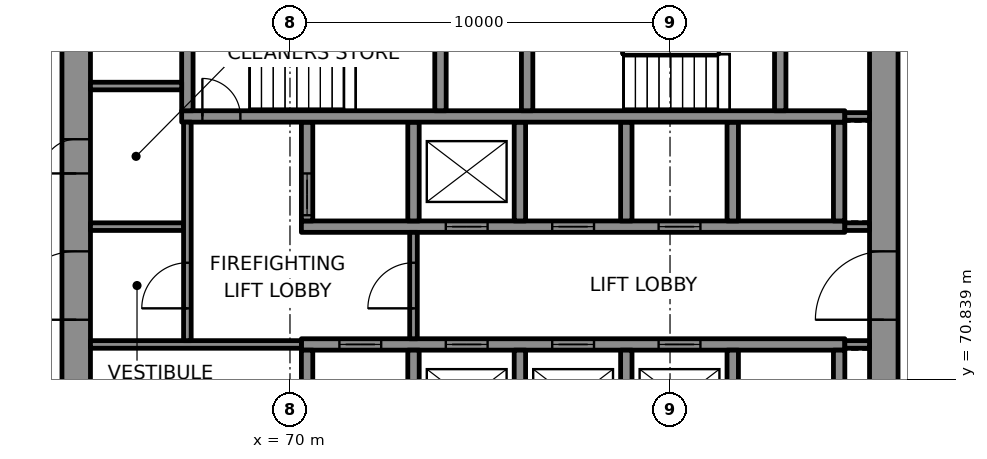
"""IFC4 building model, lengths in metres.
Left out: names, types, materials, properties, quantities, classifications, styles, units other than length and angle.
Written with IfcOpenShell. Run it as: python <this file> out.ifc"""

import sys

from ifc_helpers import new_model, si_unit, direction, frame, frame_2d, origin, place, context, subcontext, project, spatial, rectangle, extrude, element, fill, save


model = new_model("IFC4")
c1 = context("Model", 3, precision=1e-05, world=origin(), true_north=direction((0.0, 1.0)))
c2 = subcontext(c1, "Body", "Model", "MODEL_VIEW")
j1 = project(units=[si_unit("LENGTHUNIT", "METRE"), si_unit("PLANEANGLEUNIT", "RADIAN")], contexts=[c1])
p1 = place(None, origin())
s1 = spatial("IfcSite", under=j1, at=p1, CompositionType="ELEMENT")
p2 = place(p1, origin())
s2 = spatial("IfcBuilding", under=s1, at=p2, CompositionType="ELEMENT")
p3 = place(p2, frame((0.0, 0.0, 241.6)))
s3 = spatial("IfcBuildingStorey", under=s2, at=p3, CompositionType="ELEMENT", Elevation=241.6)
p4 = place(p3, frame((64.375, 67.75, 0.0), z_axis=(0.0, 0.0, 1.0), x_axis=(0.0, 1.0, 0.0)))
e1 = element("IfcWall", 1, at=p4, inside=s3, PredefinedType="SHEAR", context=c2, shape_type="SweptSolid", body=[
    extrude(rectangle(XDim=14.5, YDim=0.75, at=frame_2d((7.25, 0.0))), origin(), (0.0, 0.0, 1.0), 5.55),
])
p5 = place(p4, frame((4.65, 0.0, 0.0)))
e2 = element("IfcOpeningElement", 2, at=p5, cuts=e1, PredefinedType="OPENING", context=c2, shape_type="SweptSolid", body=[
    extrude(rectangle(XDim=1.8, YDim=2.1, at=frame_2d((0.9, 1.05))), frame((0.0, 0.385, 0.0), z_axis=(0.0, -1.0, 0.0), x_axis=(1.0, 0.0, 0.0)), (0.0, 0.0, 1.0), 0.77),
])
p6 = place(p4, frame((8.5, 0.0, 0.0)))
e3 = element("IfcOpeningElement", 3, at=p6, cuts=e1, PredefinedType="OPENING", context=c2, shape_type="SweptSolid", body=[
    extrude(rectangle(XDim=0.9, YDim=2.1, at=frame_2d((0.45, 1.05))), frame((0.0, 0.385, 0.0), z_axis=(0.0, -1.0, 0.0), x_axis=(1.0, 0.0, 0.0)), (0.0, 0.0, 1.0), 0.77),
])
p7 = place(p4, frame((12.2, 0.0, 0.0)))
e4 = element("IfcOpeningElement", 4, at=p7, cuts=e1, PredefinedType="OPENING", context=c2, shape_type="SweptSolid", body=[
    extrude(rectangle(XDim=0.9, YDim=2.1, at=frame_2d((0.45, 1.05))), frame((0.0, 0.385, 0.0), z_axis=(0.0, -1.0, 0.0), x_axis=(1.0, 0.0, 0.0)), (0.0, 0.0, 1.0), 0.77),
])
p8 = place(p3, frame((85.625, 67.75, 0.0), z_axis=(0.0, 0.0, 1.0), x_axis=(0.0, 1.0, 0.0)))
e5 = element("IfcWall", 5, at=p8, inside=s3, PredefinedType="SHEAR", context=c2, shape_type="SweptSolid", body=[
    extrude(rectangle(XDim=14.5, YDim=0.75, at=frame_2d((7.25, 0.0))), origin(), (0.0, 0.0, 1.0), 5.55),
])
p9 = place(p8, frame((4.65, 0.0, 0.0)))
e6 = element("IfcOpeningElement", 6, at=p9, cuts=e5, PredefinedType="OPENING", context=c2, shape_type="SweptSolid", body=[
    extrude(rectangle(XDim=1.8, YDim=2.1, at=frame_2d((0.9, 1.05))), frame((0.0, 0.385, 0.0), z_axis=(0.0, -1.0, 0.0), x_axis=(1.0, 0.0, 0.0)), (0.0, 0.0, 1.0), 0.77),
])
p10 = place(p8, frame((11.8, 0.0, 0.0)))
e7 = element("IfcOpeningElement", 7, at=p10, cuts=e5, PredefinedType="OPENING", context=c2, shape_type="SweptSolid", body=[
    extrude(rectangle(XDim=0.9, YDim=2.1, at=frame_2d((0.45, 1.05))), frame((0.0, 0.385, 0.0), z_axis=(0.0, -1.0, 0.0), x_axis=(1.0, 0.0, 0.0)), (0.0, 0.0, 1.0), 0.77),
])
p11 = place(p3, frame((70.3, 71.75, 0.0), z_axis=(0.0, 0.0, 1.0), x_axis=(1.0, 0.0, 0.0)))
e8 = element("IfcWall", 8, at=p11, inside=s3, PredefinedType="SHEAR", context=c2, shape_type="SweptSolid", body=[
    extrude(rectangle(XDim=14.3, YDim=0.3, at=frame_2d((7.15, 0.0))), origin(), (0.0, 0.0, 1.0), 5.55),
])
p12 = place(p11, frame((1.0, 0.0, 0.0)))
e9 = element("IfcOpeningElement", 9, at=p12, cuts=e8, PredefinedType="OPENING", context=c2, shape_type="SweptSolid", body=[
    extrude(rectangle(XDim=1.1, YDim=2.1, at=frame_2d((0.55, 1.05))), frame((0.0, 0.16, 0.0), z_axis=(0.0, -1.0, 0.0), x_axis=(1.0, 0.0, 0.0)), (0.0, 0.0, 1.0), 0.32),
])
p13 = place(p11, frame((3.8, 0.0, 0.0)))
e10 = element("IfcOpeningElement", 10, at=p13, cuts=e8, PredefinedType="OPENING", context=c2, shape_type="SweptSolid", body=[
    extrude(rectangle(XDim=1.1, YDim=2.1, at=frame_2d((0.55, 1.05))), frame((0.0, 0.16, 0.0), z_axis=(0.0, -1.0, 0.0), x_axis=(1.0, 0.0, 0.0)), (0.0, 0.0, 1.0), 0.32),
])
p14 = place(p11, frame((6.6, 0.0, 0.0)))
e11 = element("IfcOpeningElement", 11, at=p14, cuts=e8, PredefinedType="OPENING", context=c2, shape_type="SweptSolid", body=[
    extrude(rectangle(XDim=1.1, YDim=2.1, at=frame_2d((0.55, 1.05))), frame((0.0, 0.16, 0.0), z_axis=(0.0, -1.0, 0.0), x_axis=(1.0, 0.0, 0.0)), (0.0, 0.0, 1.0), 0.32),
])
p15 = place(p11, frame((9.4, 0.0, 0.0)))
e12 = element("IfcOpeningElement", 12, at=p15, cuts=e8, PredefinedType="OPENING", context=c2, shape_type="SweptSolid", body=[
    extrude(rectangle(XDim=1.1, YDim=2.1, at=frame_2d((0.55, 1.05))), frame((0.0, 0.16, 0.0), z_axis=(0.0, -1.0, 0.0), x_axis=(1.0, 0.0, 0.0)), (0.0, 0.0, 1.0), 0.32),
])
p16 = place(p3, frame((70.3, 74.85, 0.0), z_axis=(0.0, 0.0, 1.0), x_axis=(1.0, 0.0, 0.0)))
e13 = element("IfcWall", 13, at=p16, inside=s3, PredefinedType="SHEAR", context=c2, shape_type="SweptSolid", body=[
    extrude(rectangle(XDim=14.3, YDim=0.3, at=frame_2d((7.15, 0.0))), origin(), (0.0, 0.0, 1.0), 5.55),
])
p17 = place(p16, frame((3.8, 0.0, 0.0)))
e14 = element("IfcOpeningElement", 14, at=p17, cuts=e13, PredefinedType="OPENING", context=c2, shape_type="SweptSolid", body=[
    extrude(rectangle(XDim=1.1, YDim=2.1, at=frame_2d((0.55, 1.05))), frame((0.0, 0.16, 0.0), z_axis=(0.0, -1.0, 0.0), x_axis=(1.0, 0.0, 0.0)), (0.0, 0.0, 1.0), 0.32),
])
p18 = place(p16, frame((6.6, 0.0, 0.0)))
e15 = element("IfcOpeningElement", 15, at=p18, cuts=e13, PredefinedType="OPENING", context=c2, shape_type="SweptSolid", body=[
    extrude(rectangle(XDim=1.1, YDim=2.1, at=frame_2d((0.55, 1.05))), frame((0.0, 0.16, 0.0), z_axis=(0.0, -1.0, 0.0), x_axis=(1.0, 0.0, 0.0)), (0.0, 0.0, 1.0), 0.32),
])
p19 = place(p16, frame((9.4, 0.0, 0.0)))
e16 = element("IfcOpeningElement", 16, at=p19, cuts=e13, PredefinedType="OPENING", context=c2, shape_type="SweptSolid", body=[
    extrude(rectangle(XDim=1.1, YDim=2.1, at=frame_2d((0.55, 1.05))), frame((0.0, 0.16, 0.0), z_axis=(0.0, -1.0, 0.0), x_axis=(1.0, 0.0, 0.0)), (0.0, 0.0, 1.0), 0.32),
])
p20 = place(p3, frame((70.45, 69.0, 0.0), z_axis=(0.0, 0.0, 1.0), x_axis=(0.0, 1.0, 0.0)))
e17 = element("IfcWall", 17, at=p20, inside=s3, PredefinedType="SHEAR", context=c2, shape_type="SweptSolid", body=[
    extrude(rectangle(XDim=2.6, YDim=0.3, at=frame_2d((1.3, 0.0))), origin(), (0.0, 0.0, 1.0), 5.55),
])
p21 = place(p3, frame((70.45, 75.0, 0.0), z_axis=(0.0, 0.0, 1.0), x_axis=(0.0, 1.0, 0.0)))
e18 = element("IfcWall", 18, at=p21, inside=s3, PredefinedType="SHEAR", context=c2, shape_type="SweptSolid", body=[
    extrude(rectangle(XDim=2.6, YDim=0.3, at=frame_2d((1.3, 0.0))), origin(), (0.0, 0.0, 1.0), 5.55),
])
p22 = place(p21, frame((0.15, 0.0, 0.0)))
e19 = element("IfcOpeningElement", 19, at=p22, cuts=e18, PredefinedType="OPENING", context=c2, shape_type="SweptSolid", body=[
    extrude(rectangle(XDim=1.1, YDim=2.1, at=frame_2d((0.55, 1.05))), frame((0.0, 0.16, 0.0), z_axis=(0.0, -1.0, 0.0), x_axis=(1.0, 0.0, 0.0)), (0.0, 0.0, 1.0), 0.32),
])
for number, where, z_axis, x_axis in (
    (20, (73.25, 69.0, 0.0), (0.0, 0.0, 1.0), (0.0, 1.0, 0.0)),
    (21, (73.25, 75.0, 0.0), (0.0, 0.0, 1.0), (0.0, 1.0, 0.0)),
    (22, (76.05, 69.0, 0.0), (0.0, 0.0, 1.0), (0.0, 1.0, 0.0)),
    (23, (76.05, 75.0, 0.0), (0.0, 0.0, 1.0), (0.0, 1.0, 0.0)),
    (24, (78.85, 69.0, 0.0), (0.0, 0.0, 1.0), (0.0, 1.0, 0.0)),
    (25, (78.85, 75.0, 0.0), (0.0, 0.0, 1.0), (0.0, 1.0, 0.0)),
    (26, (81.65, 69.0, 0.0), (0.0, 0.0, 1.0), (0.0, 1.0, 0.0)),
    (27, (81.65, 75.0, 0.0), (0.0, 0.0, 1.0), (0.0, 1.0, 0.0)),
    (28, (84.45, 69.0, 0.0), (0.0, 0.0, 1.0), (0.0, 1.0, 0.0)),
    (29, (84.45, 75.0, 0.0), (0.0, 0.0, 1.0), (0.0, 1.0, 0.0)),
):
    element("IfcWall", number, at=place(p3, frame(where, z_axis=z_axis, x_axis=x_axis)), inside=s3, PredefinedType="SHEAR", context=c2, shape_type="SweptSolid", body=[
        extrude(rectangle(XDim=2.6, YDim=0.3, at=frame_2d((1.3, 0.0))), origin(), (0.0, 0.0, 1.0), 5.55),
    ])
p23 = place(p3, frame((67.15, 77.75, 0.0), z_axis=(0.0, 0.0, 1.0), x_axis=(1.0, 0.0, 0.0)))
e30 = element("IfcWall", 30, at=p23, inside=s3, PredefinedType="SHEAR", context=c2, shape_type="SweptSolid", body=[
    extrude(rectangle(XDim=17.45, YDim=0.3, at=frame_2d((8.725, 0.0))), origin(), (0.0, 0.0, 1.0), 5.55),
])
p24 = place(p23, frame((0.545, 0.0, 0.0)))
e31 = element("IfcOpeningElement", 31, at=p24, cuts=e30, PredefinedType="OPENING", context=c2, shape_type="SweptSolid", body=[
    extrude(rectangle(XDim=1.0, YDim=2.1, at=frame_2d((0.5, 1.05))), frame((0.0, 0.16, 0.0), z_axis=(0.0, -1.0, 0.0), x_axis=(1.0, 0.0, 0.0)), (0.0, 0.0, 1.0), 0.32),
])
for number, where, z_axis, x_axis in (
    (32, (67.3, 77.9, 0.0), (0.0, 0.0, 1.0), (0.0, 1.0, 0.0)),
    (33, (73.96, 77.9, 0.0), (0.0, 0.0, 1.0), (0.0, 1.0, 0.0)),
    (34, (76.24, 77.9, 0.0), (0.0, 0.0, 1.0), (0.0, 1.0, 0.0)),
    (35, (82.9, 77.9, 0.0), (0.0, 0.0, 1.0), (0.0, 1.0, 0.0)),
):
    element("IfcWall", number, at=place(p3, frame(where, z_axis=z_axis, x_axis=x_axis)), inside=s3, PredefinedType="SHEAR", context=c2, shape_type="SweptSolid", body=[
        extrude(rectangle(XDim=3.08, YDim=0.3, at=frame_2d((1.54, 0.0))), origin(), (0.0, 0.0, 1.0), 5.55),
    ])
p25 = place(p3, frame((64.75, 71.75, 0.0), z_axis=(0.0, 0.0, 1.0), x_axis=(1.0, 0.0, 0.0)))
e36 = element("IfcWall", 36, at=p25, inside=s3, PredefinedType="PARTITIONING", context=c2, shape_type="SweptSolid", body=[
    extrude(rectangle(XDim=5.55, YDim=0.2, at=frame_2d((2.775, 0.0))), origin(), (0.0, 0.0, 1.0), 5.55),
])
p26 = place(p3, frame((84.6, 71.75, 0.0), z_axis=(0.0, 0.0, 1.0), x_axis=(1.0, 0.0, 0.0)))
e37 = element("IfcWall", 37, at=p26, inside=s3, PredefinedType="PARTITIONING", context=c2, shape_type="SweptSolid", body=[
    extrude(rectangle(XDim=0.65, YDim=0.2, at=frame_2d((0.325, 0.0))), origin(), (0.0, 0.0, 1.0), 5.55),
])
p27 = place(p3, frame((64.75, 74.85, 0.0), z_axis=(0.0, 0.0, 1.0), x_axis=(1.0, 0.0, 0.0)))
e38 = element("IfcWall", 38, at=p27, inside=s3, PredefinedType="PARTITIONING", context=c2, shape_type="SweptSolid", body=[
    extrude(rectangle(XDim=2.45, YDim=0.2, at=frame_2d((1.225, 0.0))), origin(), (0.0, 0.0, 1.0), 5.55),
])
for number, where, z_axis, x_axis in (
    (39, (84.6, 74.85, 0.0), (0.0, 0.0, 1.0), (1.0, 0.0, 0.0)),
    (40, (84.6, 77.75, 0.0), (0.0, 0.0, 1.0), (1.0, 0.0, 0.0)),
):
    element("IfcWall", number, at=place(p3, frame(where, z_axis=z_axis, x_axis=x_axis)), inside=s3, PredefinedType="PARTITIONING", context=c2, shape_type="SweptSolid", body=[
        extrude(rectangle(XDim=0.65, YDim=0.2, at=frame_2d((0.325, 0.0))), origin(), (0.0, 0.0, 1.0), 5.55),
    ])
p28 = place(p3, frame((64.75, 78.55, 0.0), z_axis=(0.0, 0.0, 1.0), x_axis=(1.0, 0.0, 0.0)))
e41 = element("IfcWall", 41, at=p28, inside=s3, PredefinedType="PARTITIONING", context=c2, shape_type="SweptSolid", body=[
    extrude(rectangle(XDim=2.4, YDim=0.2, at=frame_2d((1.2, 0.0))), origin(), (0.0, 0.0, 1.0), 5.55),
])
p29 = place(p3, frame((67.3, 71.85, 0.0), z_axis=(0.0, 0.0, 1.0), x_axis=(0.0, 1.0, 0.0)))
e42 = element("IfcWall", 42, at=p29, inside=s3, PredefinedType="PARTITIONING", context=c2, shape_type="SweptSolid", body=[
    extrude(rectangle(XDim=5.75, YDim=0.2, at=frame_2d((2.875, 0.0))), origin(), (0.0, 0.0, 1.0), 5.55),
])
p30 = place(p29, frame((0.85, 0.0, 0.0)))
e43 = element("IfcOpeningElement", 43, at=p30, cuts=e42, PredefinedType="OPENING", context=c2, shape_type="SweptSolid", body=[
    extrude(rectangle(XDim=1.2, YDim=2.1, at=frame_2d((0.6, 1.05))), frame((0.0, 0.11, 0.0), z_axis=(0.0, -1.0, 0.0), x_axis=(1.0, 0.0, 0.0)), (0.0, 0.0, 1.0), 0.22),
])
p31 = place(p3, frame((73.25, 71.9, 0.0), z_axis=(0.0, 0.0, 1.0), x_axis=(0.0, 1.0, 0.0)))
e44 = element("IfcWall", 44, at=p31, inside=s3, PredefinedType="PARTITIONING", context=c2, shape_type="SweptSolid", body=[
    extrude(rectangle(XDim=2.8, YDim=0.2, at=frame_2d((1.4, 0.0))), origin(), (0.0, 0.0, 1.0), 5.55),
])
p32 = place(p31, frame((0.8, 0.0, 0.0)))
e45 = element("IfcOpeningElement", 45, at=p32, cuts=e44, PredefinedType="OPENING", context=c2, shape_type="SweptSolid", body=[
    extrude(rectangle(XDim=1.2, YDim=2.1, at=frame_2d((0.6, 1.05))), frame((0.0, 0.11, 0.0), z_axis=(0.0, -1.0, 0.0), x_axis=(1.0, 0.0, 0.0)), (0.0, 0.0, 1.0), 0.22),
])
p33 = place(p12, origin())
e46 = element("IfcDoor", 46, at=p33, inside=s3, OperationType="DOUBLE_DOOR_SLIDING", PredefinedType="DOOR", context=c2, shape_type="SweptSolid", body=[
    extrude(rectangle(XDim=1.1, YDim=2.1, at=frame_2d((0.55, 1.05))), frame((0.0, 0.025, 0.0), z_axis=(0.0, -1.0, 0.0), x_axis=(1.0, 0.0, 0.0)), (0.0, 0.0, 1.0), 0.05),
])
fill(e9, e46)
p34 = place(p13, origin())
e47 = element("IfcDoor", 47, at=p34, inside=s3, OperationType="DOUBLE_DOOR_SLIDING", PredefinedType="DOOR", context=c2, shape_type="SweptSolid", body=[
    extrude(rectangle(XDim=1.1, YDim=2.1, at=frame_2d((0.55, 1.05))), frame((0.0, 0.025, 0.0), z_axis=(0.0, -1.0, 0.0), x_axis=(1.0, 0.0, 0.0)), (0.0, 0.0, 1.0), 0.05),
])
fill(e10, e47)
p35 = place(p14, origin())
e48 = element("IfcDoor", 48, at=p35, inside=s3, OperationType="DOUBLE_DOOR_SLIDING", PredefinedType="DOOR", context=c2, shape_type="SweptSolid", body=[
    extrude(rectangle(XDim=1.1, YDim=2.1, at=frame_2d((0.55, 1.05))), frame((0.0, 0.025, 0.0), z_axis=(0.0, -1.0, 0.0), x_axis=(1.0, 0.0, 0.0)), (0.0, 0.0, 1.0), 0.05),
])
fill(e11, e48)
p36 = place(p15, origin())
e49 = element("IfcDoor", 49, at=p36, inside=s3, OperationType="DOUBLE_DOOR_SLIDING", PredefinedType="DOOR", context=c2, shape_type="SweptSolid", body=[
    extrude(rectangle(XDim=1.1, YDim=2.1, at=frame_2d((0.55, 1.05))), frame((0.0, 0.025, 0.0), z_axis=(0.0, -1.0, 0.0), x_axis=(1.0, 0.0, 0.0)), (0.0, 0.0, 1.0), 0.05),
])
fill(e12, e49)
p37 = place(p22, origin())
e50 = element("IfcDoor", 50, at=p37, inside=s3, OperationType="DOUBLE_DOOR_SLIDING", PredefinedType="DOOR", context=c2, shape_type="SweptSolid", body=[
    extrude(rectangle(XDim=1.1, YDim=2.1, at=frame_2d((0.55, 1.05))), frame((0.0, 0.025, 0.0), z_axis=(0.0, -1.0, 0.0), x_axis=(1.0, 0.0, 0.0)), (0.0, 0.0, 1.0), 0.05),
])
fill(e19, e50)
p38 = place(p17, origin())
e51 = element("IfcDoor", 51, at=p38, inside=s3, OperationType="DOUBLE_DOOR_SLIDING", PredefinedType="DOOR", context=c2, shape_type="SweptSolid", body=[
    extrude(rectangle(XDim=1.1, YDim=2.1, at=frame_2d((0.55, 1.05))), frame((0.0, 0.025, 0.0), z_axis=(0.0, -1.0, 0.0), x_axis=(1.0, 0.0, 0.0)), (0.0, 0.0, 1.0), 0.05),
])
fill(e14, e51)
p39 = place(p18, origin())
e52 = element("IfcDoor", 52, at=p39, inside=s3, OperationType="DOUBLE_DOOR_SLIDING", PredefinedType="DOOR", context=c2, shape_type="SweptSolid", body=[
    extrude(rectangle(XDim=1.1, YDim=2.1, at=frame_2d((0.55, 1.05))), frame((0.0, 0.025, 0.0), z_axis=(0.0, -1.0, 0.0), x_axis=(1.0, 0.0, 0.0)), (0.0, 0.0, 1.0), 0.05),
])
fill(e15, e52)
p40 = place(p19, origin())
e53 = element("IfcDoor", 53, at=p40, inside=s3, OperationType="DOUBLE_DOOR_SLIDING", PredefinedType="DOOR", context=c2, shape_type="SweptSolid", body=[
    extrude(rectangle(XDim=1.1, YDim=2.1, at=frame_2d((0.55, 1.05))), frame((0.0, 0.025, 0.0), z_axis=(0.0, -1.0, 0.0), x_axis=(1.0, 0.0, 0.0)), (0.0, 0.0, 1.0), 0.05),
])
fill(e16, e53)
p41 = place(p24, origin())
e54 = element("IfcDoor", 54, at=p41, inside=s3, OperationType="SINGLE_SWING_LEFT", PredefinedType="DOOR", context=c2, shape_type="SweptSolid", body=[
    extrude(rectangle(XDim=1.0, YDim=2.1, at=frame_2d((0.5, 1.05))), frame((0.0, 0.025, 0.0), z_axis=(0.0, -1.0, 0.0), x_axis=(1.0, 0.0, 0.0)), (0.0, 0.0, 1.0), 0.05),
])
fill(e31, e54)
p42 = place(p32, origin())
e55 = element("IfcDoor", 55, at=p42, inside=s3, OperationType="SINGLE_SWING_LEFT", PredefinedType="DOOR", context=c2, shape_type="SweptSolid", body=[
    extrude(rectangle(XDim=1.2, YDim=2.1, at=frame_2d((0.6, 1.05))), frame((0.0, 0.025, 0.0), z_axis=(0.0, -1.0, 0.0), x_axis=(1.0, 0.0, 0.0)), (0.0, 0.0, 1.0), 0.05),
])
fill(e45, e55)
p43 = place(p30, origin())
e56 = element("IfcDoor", 56, at=p43, inside=s3, OperationType="SINGLE_SWING_RIGHT", PredefinedType="DOOR", context=c2, shape_type="SweptSolid", body=[
    extrude(rectangle(XDim=1.2, YDim=2.1, at=frame_2d((0.6, 1.05))), frame((0.0, 0.025, 0.0), z_axis=(0.0, -1.0, 0.0), x_axis=(1.0, 0.0, 0.0)), (0.0, 0.0, 1.0), 0.05),
])
fill(e43, e56)
p44 = place(p5, origin())
e57 = element("IfcDoor", 57, at=p44, inside=s3, OperationType="SINGLE_SWING_LEFT", PredefinedType="DOOR", context=c2, shape_type="SweptSolid", body=[
    extrude(rectangle(XDim=1.8, YDim=2.1, at=frame_2d((0.9, 1.05))), frame((0.0, 0.095, 0.0), z_axis=(0.0, -1.0, 0.0), x_axis=(1.0, 0.0, 0.0)), (0.0, 0.0, 1.0), 0.19),
])
fill(e2, e57)
p45 = place(p9, origin())
e58 = element("IfcDoor", 58, at=p45, inside=s3, OperationType="SINGLE_SWING_RIGHT", PredefinedType="DOOR", context=c2, shape_type="SweptSolid", body=[
    extrude(rectangle(XDim=1.8, YDim=2.1, at=frame_2d((0.9, 1.05))), frame((0.0, 0.095, 0.0), z_axis=(0.0, -1.0, 0.0), x_axis=(1.0, 0.0, 0.0)), (0.0, 0.0, 1.0), 0.19),
])
fill(e6, e58)
p46 = place(p6, origin())
e59 = element("IfcDoor", 59, at=p46, inside=s3, OperationType="SINGLE_SWING_RIGHT", PredefinedType="DOOR", context=c2, shape_type="SweptSolid", body=[
    extrude(rectangle(XDim=0.9, YDim=2.1, at=frame_2d((0.45, 1.05))), frame((0.0, 0.095, 0.0), z_axis=(0.0, -1.0, 0.0), x_axis=(1.0, 0.0, 0.0)), (0.0, 0.0, 1.0), 0.19),
])
fill(e3, e59)
save(model, sys.argv[1])
